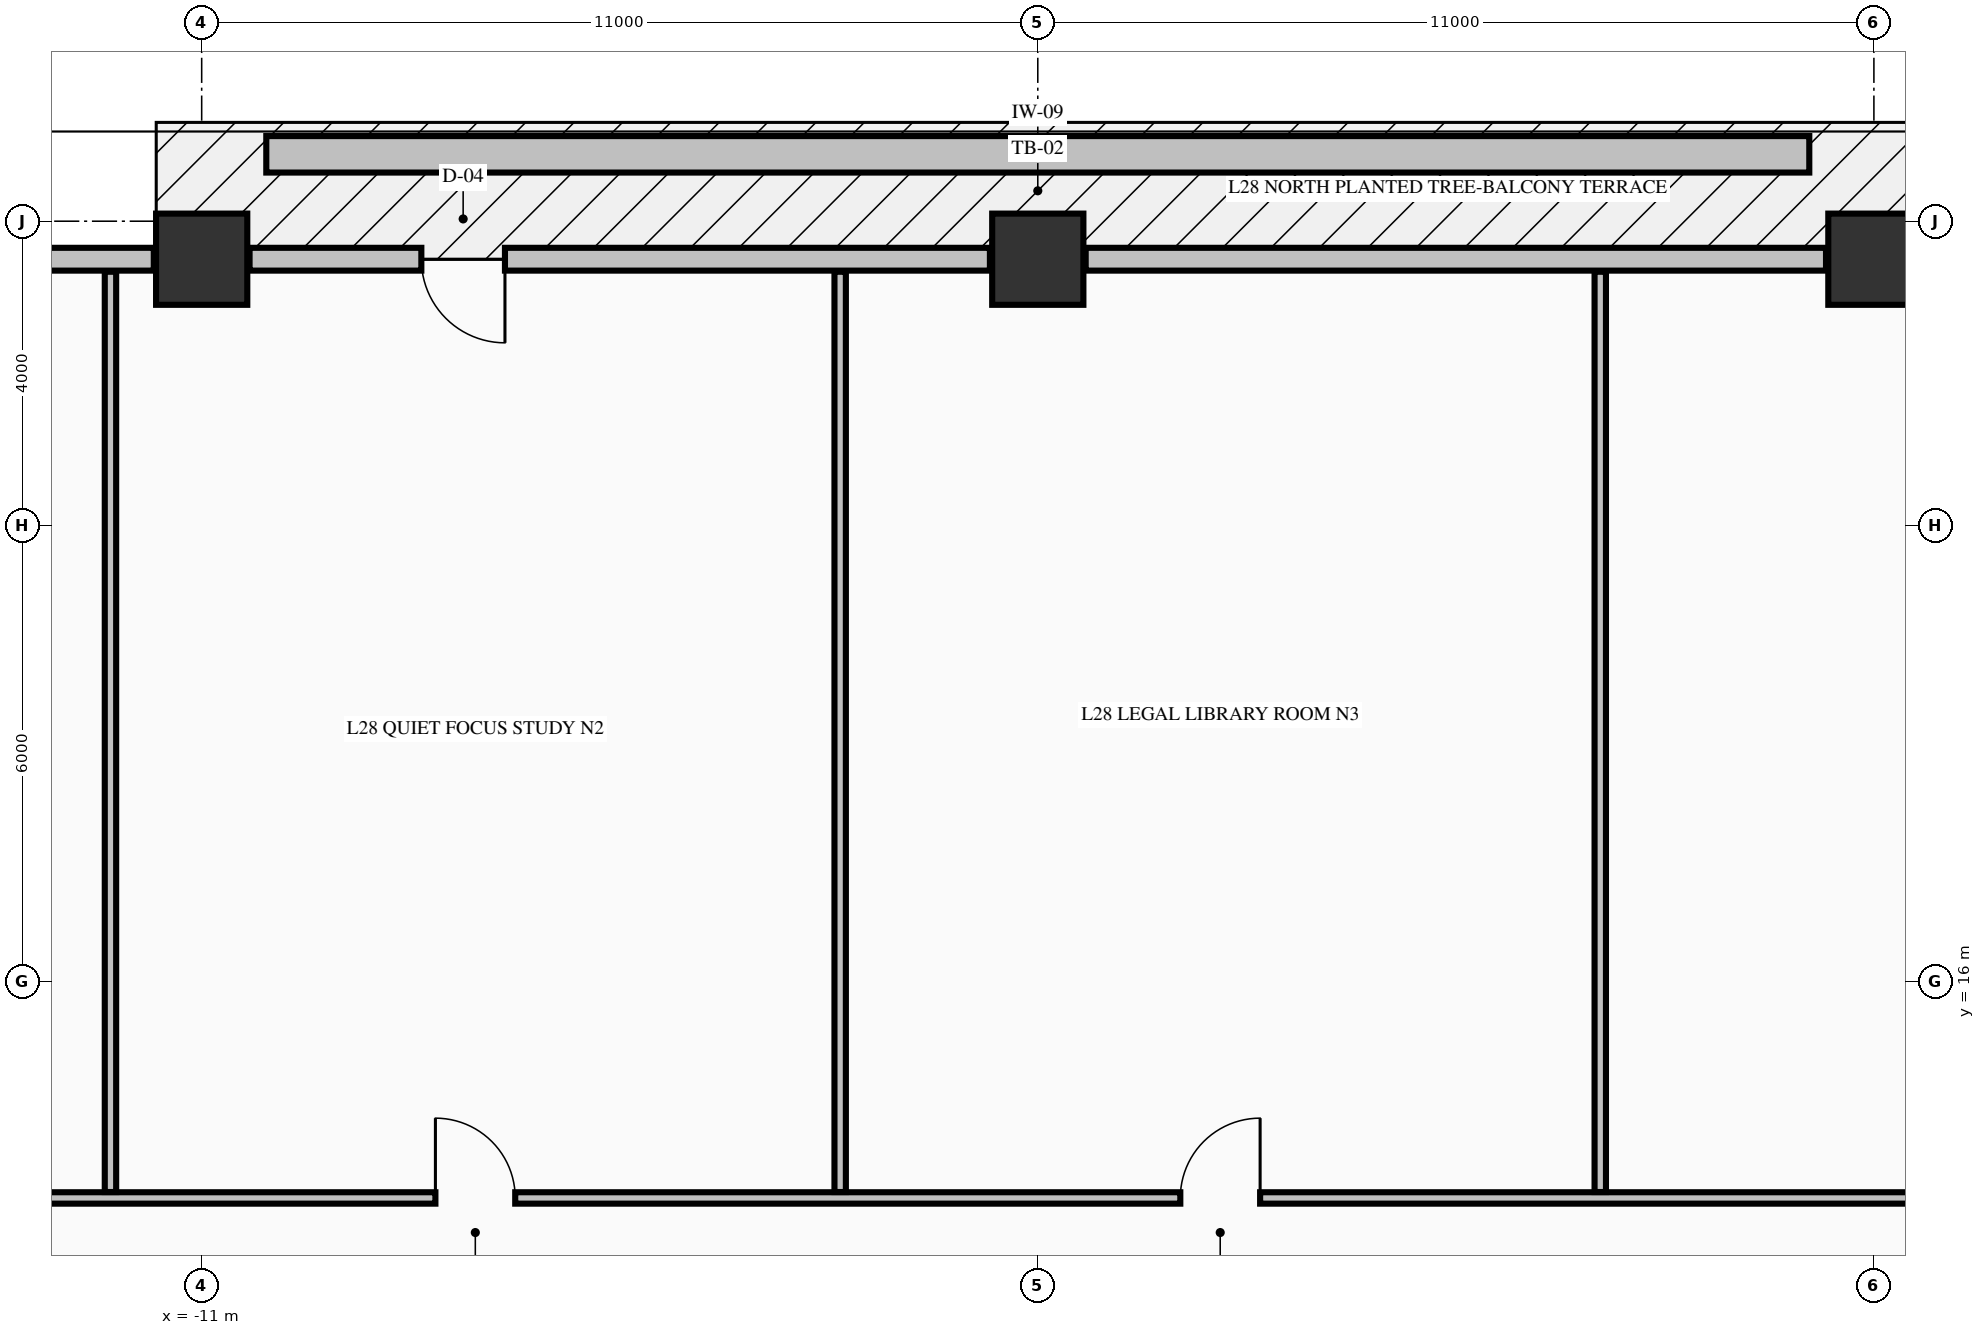
"""IFC4 building model, lengths in metres.
Left out: names, types, materials, properties, quantities, classifications, styles, units other than length and angle.
Written with IfcOpenShell. Run it as: python <this file> out.ifc"""

import sys

from ifc_helpers import new_model, si_unit, direction, frame, frame_2d, origin, origin_2d, place, context, subcontext, project, spatial, rectangle, extrude, element, fill, save


model = new_model("IFC4")
c1 = context("Model", 3, precision=1e-05, world=origin(), true_north=direction((0.0, 1.0)))
c2 = subcontext(c1, "Body", "Model", "MODEL_VIEW")
j1 = project(units=[si_unit("LENGTHUNIT", "METRE"), si_unit("PLANEANGLEUNIT", "RADIAN")], contexts=[c1])
p1 = place(None, origin())
s1 = spatial("IfcSite", under=j1, at=p1, CompositionType="ELEMENT")
p2 = place(p1, origin())
s2 = spatial("IfcBuilding", under=s1, at=p2, CompositionType="ELEMENT")
p3 = place(p2, frame((0.0, 0.0, 112.78)))
s3 = spatial("IfcBuildingStorey", under=s2, at=p3, CompositionType="ELEMENT", Elevation=112.78)
for number, where, z_axis, x_axis in (
    (1, (-11.0, 25.5, -0.25), (0.0, 0.0, 1.0), (1.0, 0.0, 0.0)),
    (2, (0.0, 25.5, -0.25), (0.0, 0.0, 1.0), (1.0, 0.0, 0.0)),
    (3, (11.0, 25.5, -0.25), (0.0, 0.0, 1.0), (1.0, 0.0, 0.0)),
):
    element("IfcColumn", number, at=place(p3, frame(where, z_axis=z_axis, x_axis=x_axis)), inside=s3, PredefinedType="COLUMN", context=c2, shape_type="SweptSolid", body=[
        extrude(rectangle(XDim=1.2, YDim=1.2, at=origin_2d()), origin(), (0.0, 0.0, 1.0), 3.395),
    ])
p4 = place(p3, frame((-11.63, 25.5, 0.0), z_axis=(0.0, 0.0, 1.0), x_axis=(-1.0, 0.0, 0.0)))
e4 = element("IfcWall", 4, at=p4, inside=s3, PredefinedType="STANDARD", context=c2, shape_type="SweptSolid", body=[
    extrude(rectangle(XDim=6.24, YDim=0.3, at=frame_2d((3.12, 0.0))), origin(), (0.0, 0.0, 1.0), 2.537),
])
p5 = place(p3, frame((-0.63, 25.5, 0.0), z_axis=(0.0, 0.0, 1.0), x_axis=(-1.0, 0.0, 0.0)))
e5 = element("IfcWall", 5, at=p5, inside=s3, PredefinedType="STANDARD", context=c2, shape_type="SweptSolid", body=[
    extrude(rectangle(XDim=9.74, YDim=0.3, at=frame_2d((4.87, 0.0))), origin(), (0.0, 0.0, 1.0), 2.537),
])
p6 = place(p5, frame((6.38, 0.0, 0.0)))
e6 = element("IfcOpeningElement", 6, at=p6, cuts=e5, PredefinedType="OPENING", context=c2, shape_type="SweptSolid", body=[
    extrude(rectangle(XDim=1.1, YDim=2.15, at=frame_2d((0.55, 1.075))), frame((0.0, 0.16, 0.0), z_axis=(0.0, -1.0, 0.0), x_axis=(1.0, 0.0, 0.0)), (0.0, 0.0, 1.0), 0.32),
])
p7 = place(p3, frame((10.37, 25.5, 0.0), z_axis=(0.0, 0.0, 1.0), x_axis=(-1.0, 0.0, 0.0)))
e7 = element("IfcWall", 7, at=p7, inside=s3, PredefinedType="STANDARD", context=c2, shape_type="SweptSolid", body=[
    extrude(rectangle(XDim=9.74, YDim=0.3, at=frame_2d((4.87, 0.0))), origin(), (0.0, 0.0, 1.0), 2.537),
])
p8 = place(p3, frame((-22.835, 13.15, 0.0), z_axis=(0.0, 0.0, 1.0), x_axis=(1.0, 0.0, 0.0)))
e8 = element("IfcWall", 8, at=p8, inside=s3, PredefinedType="PARTITIONING", context=c2, shape_type="SweptSolid", body=[
    extrude(rectangle(XDim=50.67, YDim=0.15, at=frame_2d((25.335, 0.0))), origin(), (0.0, 0.0, 1.0), 3.145),
])
p9 = place(p8, frame((7.01, 0.0, 0.0)))
e9 = element("IfcOpeningElement", 9, at=p9, cuts=e8, PredefinedType="OPENING", context=c2, shape_type="SweptSolid", body=[
    extrude(rectangle(XDim=0.95, YDim=2.15, at=frame_2d((0.475, 1.075))), frame((0.0, 0.085, 0.0), z_axis=(0.0, -1.0, 0.0), x_axis=(1.0, 0.0, 0.0)), (0.0, 0.0, 1.0), 0.17),
])
p10 = place(p8, frame((14.91, 0.0, 0.0)))
e10 = element("IfcOpeningElement", 10, at=p10, cuts=e8, PredefinedType="OPENING", context=c2, shape_type="SweptSolid", body=[
    extrude(rectangle(XDim=1.05, YDim=2.15, at=frame_2d((0.525, 1.075))), frame((0.0, 0.085, 0.0), z_axis=(0.0, -1.0, 0.0), x_axis=(1.0, 0.0, 0.0)), (0.0, 0.0, 1.0), 0.17),
])
p11 = place(p8, frame((24.71, 0.0, 0.0)))
e11 = element("IfcOpeningElement", 11, at=p11, cuts=e8, PredefinedType="OPENING", context=c2, shape_type="SweptSolid", body=[
    extrude(rectangle(XDim=1.05, YDim=2.15, at=frame_2d((0.525, 1.075))), frame((0.0, 0.085, 0.0), z_axis=(0.0, -1.0, 0.0), x_axis=(1.0, 0.0, 0.0)), (0.0, 0.0, 1.0), 0.17),
])
p12 = place(p8, frame((35.91, 0.0, 0.0)))
e12 = element("IfcOpeningElement", 12, at=p12, cuts=e8, PredefinedType="OPENING", context=c2, shape_type="SweptSolid", body=[
    extrude(rectangle(XDim=1.05, YDim=2.15, at=frame_2d((0.525, 1.075))), frame((0.0, 0.085, 0.0), z_axis=(0.0, -1.0, 0.0), x_axis=(1.0, 0.0, 0.0)), (0.0, 0.0, 1.0), 0.17),
])
for number, where, z_axis, x_axis in (
    (13, (-12.2, 13.228, 0.0), (0.0, 0.0, 1.0), (0.0, 1.0, 0.0)),
    (14, (-2.6, 13.228, 0.0), (0.0, 0.0, 1.0), (0.0, 1.0, 0.0)),
    (15, (7.4, 13.228, 0.0), (0.0, 0.0, 1.0), (0.0, 1.0, 0.0)),
):
    element("IfcWall", number, at=place(p3, frame(where, z_axis=z_axis, x_axis=x_axis)), inside=s3, PredefinedType="PARTITIONING", context=c2, shape_type="SweptSolid", body=[
        extrude(rectangle(XDim=12.107, YDim=0.15, at=frame_2d((6.053, 0.0))), origin(), (0.0, 0.0, 1.0), 3.145),
    ])
p13 = place(p3, frame((-10.15, 26.88, -0.04), z_axis=(0.0, 0.0, 1.0), x_axis=(1.0, 0.0, 0.0)))
e16 = element("IfcWall", 16, at=p13, inside=s3, PredefinedType="PARAPET", context=c2, shape_type="SweptSolid", body=[
    extrude(rectangle(XDim=20.3, YDim=0.48, at=frame_2d((10.15, 0.0))), origin(), (0.0, 0.0, 1.0), 0.52),
])
p14 = place(p6, origin())
e17 = element("IfcDoor", 17, at=p14, inside=s3, OperationType="SINGLE_SWING_LEFT", PredefinedType="DOOR", context=c2, shape_type="SweptSolid", body=[
    extrude(rectangle(XDim=1.1, YDim=2.15, at=frame_2d((0.55, 1.075))), frame((0.0, 0.025, 0.0), z_axis=(0.0, -1.0, 0.0), x_axis=(1.0, 0.0, 0.0)), (0.0, 0.0, 1.0), 0.05),
])
fill(e6, e17)
p15 = place(p10, origin())
e18 = element("IfcDoor", 18, at=p15, inside=s3, OperationType="SINGLE_SWING_LEFT", PredefinedType="DOOR", context=c2, shape_type="SweptSolid", body=[
    extrude(rectangle(XDim=1.05, YDim=2.15, at=frame_2d((0.525, 1.075))), frame((0.0, 0.025, 0.0), z_axis=(0.0, -1.0, 0.0), x_axis=(1.0, 0.0, 0.0)), (0.0, 0.0, 1.0), 0.05),
])
fill(e10, e18)
p16 = place(p11, origin())
e19 = element("IfcDoor", 19, at=p16, inside=s3, OperationType="SINGLE_SWING_RIGHT", PredefinedType="DOOR", context=c2, shape_type="SweptSolid", body=[
    extrude(rectangle(XDim=1.05, YDim=2.15, at=frame_2d((0.525, 1.075))), frame((0.0, 0.025, 0.0), z_axis=(0.0, -1.0, 0.0), x_axis=(1.0, 0.0, 0.0)), (0.0, 0.0, 1.0), 0.05),
])
fill(e11, e19)
save(model, sys.argv[1])
